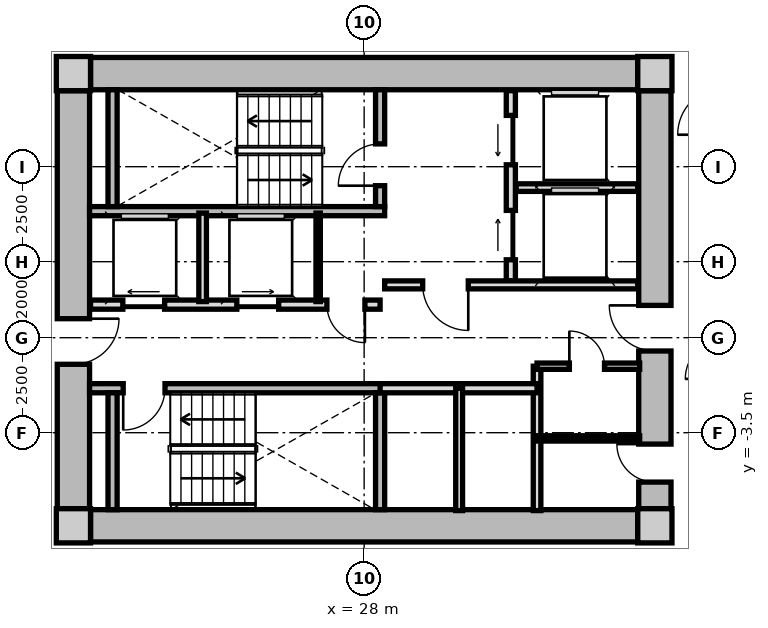
"""IFC4 building model, lengths in metres.
Left out: names, types, materials, properties, quantities, classifications, styles, units other than length and angle.
Written with IfcOpenShell. Run it as: python <this file> out.ifc"""

import sys

from ifc_helpers import new_model, si_unit, direction, frame, frame_2d, origin, origin_2d, place, context, subcontext, project, spatial, rectangle, extrude, source, transform, mapped, element, fill, save


model = new_model("IFC4")
c1 = context("Model", 3, precision=1e-05, world=origin(), true_north=direction((0.0, 1.0)))
c2 = subcontext(c1, "Body", "Model", "MODEL_VIEW")
j1 = project(units=[si_unit("LENGTHUNIT", "METRE"), si_unit("PLANEANGLEUNIT", "RADIAN")], contexts=[c1])
p1 = place(None, origin())
s1 = spatial("IfcSite", under=j1, at=p1, CompositionType="ELEMENT")
p2 = place(p1, origin())
s2 = spatial("IfcBuilding", under=s1, at=p2, CompositionType="ELEMENT")
p3 = place(p2, frame((0.0, 0.0, 55.15)))
s3 = spatial("IfcBuildingStorey", under=s2, at=p3, CompositionType="ELEMENT", Elevation=55.15)
m1 = source(origin(), c2, "Body", "SweptSolid", [
    extrude(rectangle(XDim=0.9, YDim=0.9, at=origin_2d()), origin(), (0.0, 0.0, 1.0), 3.05),
])
for number, where, z_axis, x_axis in (
    (1, (20.35, -5.95, 0.0), (0.0, 0.0, 1.0), (1.0, 0.0, 0.0)),
    (2, (35.65, -5.95, 0.0), (0.0, 0.0, 1.0), (1.0, 0.0, 0.0)),
    (3, (35.65, 5.95, 0.0), (0.0, 0.0, 1.0), (1.0, 0.0, 0.0)),
    (4, (20.35, 5.95, 0.0), (0.0, 0.0, 1.0), (1.0, 0.0, 0.0)),
):
    element("IfcColumn", number, at=place(p3, frame(where, z_axis=z_axis, x_axis=x_axis)), inside=s3, PredefinedType="COLUMN", context=c2, shape_type="MappedRepresentation", body=[
        mapped(m1, transform((0.0, 0.0, 0.0), x_axis=(1.0, 0.0, 0.0), y_axis=(0.0, 1.0, 0.0), z_axis=(0.0, 0.0, 1.0), scale=1.0)),
    ])
m2 = source(origin(), c2, "Body", "SweptSolid", [
    extrude(rectangle(XDim=14.4, YDim=0.85, at=frame_2d((7.2, 0.0))), origin(), (0.0, 0.0, 1.0), 2.79),
])
for number, where, z_axis, x_axis in (
    (5, (20.8, 5.95, 0.0), (0.0, 0.0, 1.0), (1.0, 0.0, 0.0)),
    (6, (35.2, -5.95, 0.0), (0.0, 0.0, 1.0), (-1.0, 0.0, 0.0)),
):
    element("IfcWall", number, at=place(p3, frame(where, z_axis=z_axis, x_axis=x_axis)), inside=s3, PredefinedType="SHEAR", context=c2, shape_type="MappedRepresentation", body=[
        mapped(m2, transform((0.0, 0.0, 0.0), x_axis=(1.0, 0.0, 0.0), y_axis=(0.0, 1.0, 0.0), z_axis=(0.0, 0.0, 1.0), scale=1.0)),
    ])
m3 = source(origin(), c2, "Body", "SweptSolid", [
    extrude(rectangle(XDim=11.0, YDim=0.85, at=frame_2d((5.5, 0.0))), origin(), (0.0, 0.0, 1.0), 2.79),
])
p4 = place(p3, frame((20.35, -5.5, 0.0), z_axis=(0.0, 0.0, 1.0), x_axis=(0.0, 1.0, 0.0)))
e7 = element("IfcWall", 7, at=p4, inside=s3, PredefinedType="SHEAR", context=c2, shape_type="MappedRepresentation", body=[
    mapped(m3, transform((0.0, 0.0, 0.0), x_axis=(1.0, 0.0, 0.0), y_axis=(0.0, 1.0, 0.0), z_axis=(0.0, 0.0, 1.0), scale=1.0)),
])
p5 = place(p4, frame((3.8, 0.0, 0.0)))
e8 = element("IfcOpeningElement", 8, at=p5, cuts=e7, PredefinedType="OPENING", context=c2, shape_type="SweptSolid", body=[
    extrude(rectangle(XDim=1.2, YDim=2.15, at=frame_2d((0.6, 1.075))), frame((0.0, 0.435, 0.0), z_axis=(0.0, -1.0, 0.0), x_axis=(1.0, 0.0, 0.0)), (0.0, 0.0, 1.0), 0.87),
])
p6 = place(p3, frame((35.65, 5.5, 0.0), z_axis=(0.0, 0.0, 1.0), x_axis=(0.0, -1.0, 0.0)))
e9 = element("IfcWall", 9, at=p6, inside=s3, PredefinedType="SHEAR", context=c2, shape_type="MappedRepresentation", body=[
    mapped(m3, transform((0.0, 0.0, 0.0), x_axis=(1.0, 0.0, 0.0), y_axis=(0.0, 1.0, 0.0), z_axis=(0.0, 0.0, 1.0), scale=1.0)),
])
p7 = place(p6, frame((5.65, 0.0, 0.0)))
e10 = element("IfcOpeningElement", 10, at=p7, cuts=e9, PredefinedType="OPENING", context=c2, shape_type="SweptSolid", body=[
    extrude(rectangle(XDim=1.2, YDim=2.15, at=frame_2d((0.6, 1.075))), frame((0.0, 0.435, 0.0), z_axis=(0.0, -1.0, 0.0), x_axis=(1.0, 0.0, 0.0)), (0.0, 0.0, 1.0), 0.87),
])
p8 = place(p6, frame((9.3, 0.0, 0.0)))
e11 = element("IfcOpeningElement", 11, at=p8, cuts=e9, PredefinedType="OPENING", context=c2, shape_type="SweptSolid", body=[
    extrude(rectangle(XDim=1.0, YDim=2.1, at=frame_2d((0.5, 1.05))), frame((0.0, 0.435, 0.0), z_axis=(0.0, -1.0, 0.0), x_axis=(1.0, 0.0, 0.0)), (0.0, 0.0, 1.0), 0.87),
])
m4 = source(origin(), c2, "Body", "SweptSolid", [
    extrude(rectangle(XDim=7.765, YDim=0.24, at=frame_2d((3.883, 0.0))), origin(), (0.0, 0.0, 1.0), 2.79),
])
p9 = place(p3, frame((20.775, 2.33, 0.0), z_axis=(0.0, 0.0, 1.0), x_axis=(1.0, 0.0, 0.0)))
e12 = element("IfcWall", 12, at=p9, inside=s3, PredefinedType="PARTITIONING", context=c2, shape_type="MappedRepresentation", body=[
    mapped(m4, transform((0.0, 0.0, 0.0), x_axis=(1.0, 0.0, 0.0), y_axis=(0.0, 1.0, 0.0), z_axis=(0.0, 0.0, 1.0), scale=1.0)),
])
m5 = source(origin(), c2, "Body", "SweptSolid", [
    extrude(rectangle(XDim=3.075, YDim=0.24, at=frame_2d((1.538, 0.0))), origin(), (0.0, 0.0, 1.0), 2.79),
])
p10 = place(p3, frame((21.38, 2.45, 0.0), z_axis=(0.0, 0.0, 1.0), x_axis=(0.0, 1.0, 0.0)))
e13 = element("IfcWall", 13, at=p10, inside=s3, PredefinedType="PARTITIONING", context=c2, shape_type="MappedRepresentation", body=[
    mapped(m5, transform((0.0, 0.0, 0.0), x_axis=(1.0, 0.0, 0.0), y_axis=(0.0, 1.0, 0.0), z_axis=(0.0, 0.0, 1.0), scale=1.0)),
])
p11 = place(p3, frame((28.42, 2.45, 0.0), z_axis=(0.0, 0.0, 1.0), x_axis=(0.0, 1.0, 0.0)))
e14 = element("IfcWall", 14, at=p11, inside=s3, PredefinedType="PARTITIONING", context=c2, shape_type="MappedRepresentation", body=[
    mapped(m5, transform((0.0, 0.0, 0.0), x_axis=(1.0, 0.0, 0.0), y_axis=(0.0, 1.0, 0.0), z_axis=(0.0, 0.0, 1.0), scale=1.0)),
])
p12 = place(p11, frame((0.55, 0.0, 0.0)))
e15 = element("IfcOpeningElement", 15, at=p12, cuts=e14, PredefinedType="OPENING", context=c2, shape_type="SweptSolid", body=[
    extrude(rectangle(XDim=1.1, YDim=2.15, at=frame_2d((0.55, 1.075))), frame((0.0, 0.13, 0.0), z_axis=(0.0, -1.0, 0.0), x_axis=(1.0, 0.0, 0.0)), (0.0, 0.0, 1.0), 0.26),
])
p13 = place(p3, frame((20.775, -2.33, 0.0), z_axis=(0.0, 0.0, 1.0), x_axis=(1.0, 0.0, 0.0)))
e16 = element("IfcWall", 16, at=p13, inside=s3, PredefinedType="PARTITIONING", context=c2, shape_type="MappedRepresentation", body=[
    mapped(m4, transform((0.0, 0.0, 0.0), x_axis=(1.0, 0.0, 0.0), y_axis=(0.0, 1.0, 0.0), z_axis=(0.0, 0.0, 1.0), scale=1.0)),
])
p14 = place(p13, frame((0.885, 0.0, 0.0)))
e17 = element("IfcOpeningElement", 17, at=p14, cuts=e16, PredefinedType="OPENING", context=c2, shape_type="SweptSolid", body=[
    extrude(rectangle(XDim=1.1, YDim=2.15, at=frame_2d((0.55, 1.075))), frame((0.0, 0.13, 0.0), z_axis=(0.0, -1.0, 0.0), x_axis=(1.0, 0.0, 0.0)), (0.0, 0.0, 1.0), 0.26),
])
for number, where, z_axis, x_axis in (
    (18, (21.38, -5.525, 0.0), (0.0, 0.0, 1.0), (0.0, 1.0, 0.0)),
    (19, (28.42, -5.525, 0.0), (0.0, 0.0, 1.0), (0.0, 1.0, 0.0)),
):
    element("IfcWall", number, at=place(p3, frame(where, z_axis=z_axis, x_axis=x_axis)), inside=s3, PredefinedType="PARTITIONING", context=c2, shape_type="MappedRepresentation", body=[
        mapped(m5, transform((0.0, 0.0, 0.0), x_axis=(1.0, 0.0, 0.0), y_axis=(0.0, 1.0, 0.0), z_axis=(0.0, 0.0, 1.0), scale=1.0)),
    ])
m6 = source(origin(), c2, "Body", "SweptSolid", [
    extrude(rectangle(XDim=5.0, YDim=0.24, at=frame_2d((2.5, 0.0))), origin(), (0.0, 0.0, 1.0), 2.775),
])
p15 = place(p3, frame((31.86, 0.5, 0.0), z_axis=(0.0, 0.0, 1.0), x_axis=(0.0, 1.0, 0.0)))
e20 = element("IfcWall", 20, at=p15, inside=s3, PredefinedType="PARTITIONING", context=c2, shape_type="MappedRepresentation", body=[
    mapped(m6, transform((0.0, 0.0, 0.0), x_axis=(1.0, 0.0, 0.0), y_axis=(0.0, 1.0, 0.0), z_axis=(0.0, 0.0, 1.0), scale=1.0)),
])
p16 = place(p15, frame((3.05, 0.0, 0.0)))
e21 = element("IfcOpeningElement", 21, at=p16, cuts=e20, PredefinedType="OPENING", context=c2, shape_type="SweptSolid", body=[
    extrude(rectangle(XDim=1.3, YDim=2.2, at=frame_2d((0.65, 1.1))), frame((0.0, 0.13, 0.0), z_axis=(0.0, -1.0, 0.0), x_axis=(1.0, 0.0, 0.0)), (0.0, 0.0, 1.0), 0.26),
])
p17 = place(p15, frame((0.55, 0.0, 0.0)))
e22 = element("IfcOpeningElement", 22, at=p17, cuts=e20, PredefinedType="OPENING", context=c2, shape_type="SweptSolid", body=[
    extrude(rectangle(XDim=1.3, YDim=2.2, at=frame_2d((0.65, 1.1))), frame((0.0, 0.13, 0.0), z_axis=(0.0, -1.0, 0.0), x_axis=(1.0, 0.0, 0.0)), (0.0, 0.0, 1.0), 0.26),
])
m7 = source(origin(), c2, "Body", "SweptSolid", [
    extrude(rectangle(XDim=3.2, YDim=0.2, at=frame_2d((1.6, 0.0))), origin(), (0.0, 0.0, 1.0), 2.775),
])
p18 = place(p3, frame((32.0, 2.95, 0.0), z_axis=(0.0, 0.0, 1.0), x_axis=(1.0, 0.0, 0.0)))
e23 = element("IfcWall", 23, at=p18, inside=s3, PredefinedType="PARTITIONING", context=c2, shape_type="MappedRepresentation", body=[
    mapped(m7, transform((0.0, 0.0, 0.0), x_axis=(1.0, 0.0, 0.0), y_axis=(0.0, 1.0, 0.0), z_axis=(0.0, 0.0, 1.0), scale=1.0)),
])
m8 = source(origin(), c2, "Body", "SweptSolid", [
    extrude(rectangle(XDim=6.66, YDim=0.21, at=frame_2d((3.33, 0.0))), origin(), (0.0, 0.0, 1.0), 2.775),
])
p19 = place(p3, frame((28.54, 0.39, 0.0), z_axis=(0.0, 0.0, 1.0), x_axis=(1.0, 0.0, 0.0)))
e24 = element("IfcWall", 24, at=p19, inside=s3, PredefinedType="PARTITIONING", context=c2, shape_type="MappedRepresentation", body=[
    mapped(m8, transform((0.0, 0.0, 0.0), x_axis=(1.0, 0.0, 0.0), y_axis=(0.0, 1.0, 0.0), z_axis=(0.0, 0.0, 1.0), scale=1.0)),
])
p20 = place(p19, frame((1.0, 0.0, 0.0)))
e25 = element("IfcOpeningElement", 25, at=p20, cuts=e24, PredefinedType="OPENING", context=c2, shape_type="SweptSolid", body=[
    extrude(rectangle(XDim=1.2, YDim=2.15, at=frame_2d((0.6, 1.075))), frame((0.0, 0.115, 0.0), z_axis=(0.0, -1.0, 0.0), x_axis=(1.0, 0.0, 0.0)), (0.0, 0.0, 1.0), 0.23),
])
m9 = source(origin(), c2, "Body", "SweptSolid", [
    extrude(rectangle(XDim=7.62, YDim=0.24, at=frame_2d((3.81, 0.0))), origin(), (0.0, 0.0, 1.0), 2.775),
])
p21 = place(p3, frame((20.8, -0.13, 0.0), z_axis=(0.0, 0.0, 1.0), x_axis=(1.0, 0.0, 0.0)))
e26 = element("IfcWall", 26, at=p21, inside=s3, PredefinedType="PARTITIONING", context=c2, shape_type="MappedRepresentation", body=[
    mapped(m9, transform((0.0, 0.0, 0.0), x_axis=(1.0, 0.0, 0.0), y_axis=(0.0, 1.0, 0.0), z_axis=(0.0, 0.0, 1.0), scale=1.0)),
])
p22 = place(p21, frame((6.22, 0.0, 0.0)))
e27 = element("IfcOpeningElement", 27, at=p22, cuts=e26, PredefinedType="OPENING", context=c2, shape_type="SweptSolid", body=[
    extrude(rectangle(XDim=1.0, YDim=2.1, at=frame_2d((0.5, 1.05))), frame((0.0, 0.13, 0.0), z_axis=(0.0, -1.0, 0.0), x_axis=(1.0, 0.0, 0.0)), (0.0, 0.0, 1.0), 0.26),
])
p23 = place(p21, frame((0.85, 0.0, 0.0)))
e28 = element("IfcOpeningElement", 28, at=p23, cuts=e26, PredefinedType="OPENING", context=c2, shape_type="SweptSolid", body=[
    extrude(rectangle(XDim=1.1, YDim=2.2, at=frame_2d((0.55, 1.1))), frame((0.0, 0.13, 0.0), z_axis=(0.0, -1.0, 0.0), x_axis=(1.0, 0.0, 0.0)), (0.0, 0.0, 1.0), 0.26),
])
p24 = place(p21, frame((3.85, 0.0, 0.0)))
e29 = element("IfcOpeningElement", 29, at=p24, cuts=e26, PredefinedType="OPENING", context=c2, shape_type="SweptSolid", body=[
    extrude(rectangle(XDim=1.1, YDim=2.2, at=frame_2d((0.55, 1.1))), frame((0.0, 0.13, 0.0), z_axis=(0.0, -1.0, 0.0), x_axis=(1.0, 0.0, 0.0)), (0.0, 0.0, 1.0), 0.26),
])
m10 = source(origin(), c2, "Body", "SweptSolid", [
    extrude(rectangle(XDim=2.33, YDim=0.115, at=frame_2d((1.165, 0.0))), origin(), (0.0, 0.0, 1.0), 2.775),
])
p25 = place(p3, frame((26.79, -0.05, 0.0), z_axis=(0.0, 0.0, 1.0), x_axis=(0.0, 1.0, 0.0)))
e30 = element("IfcWall", 30, at=p25, inside=s3, PredefinedType="PARTITIONING", context=c2, shape_type="MappedRepresentation", body=[
    mapped(m10, transform((0.0, 0.0, 0.0), x_axis=(1.0, 0.0, 0.0), y_axis=(0.0, 1.0, 0.0), z_axis=(0.0, 0.0, 1.0), scale=1.0)),
])
m11 = source(origin(), c2, "Body", "SweptSolid", [
    extrude(rectangle(XDim=2.33, YDim=0.2, at=frame_2d((1.165, 0.0))), origin(), (0.0, 0.0, 1.0), 2.775),
])
p26 = place(p3, frame((23.75, -0.05, 0.0), z_axis=(0.0, 0.0, 1.0), x_axis=(0.0, 1.0, 0.0)))
e31 = element("IfcWall", 31, at=p26, inside=s3, PredefinedType="PARTITIONING", context=c2, shape_type="MappedRepresentation", body=[
    mapped(m11, transform((0.0, 0.0, 0.0), x_axis=(1.0, 0.0, 0.0), y_axis=(0.0, 1.0, 0.0), z_axis=(0.0, 0.0, 1.0), scale=1.0)),
])
m12 = source(origin(), c2, "Body", "SweptSolid", [
    extrude(rectangle(XDim=3.8, YDim=0.2, at=frame_2d((1.9, 0.0))), origin(), (0.0, 0.0, 1.0), 2.775),
])
p27 = place(p3, frame((32.55, -5.55, 0.0), z_axis=(0.0, 0.0, 1.0), x_axis=(0.0, 1.0, 0.0)))
e32 = element("IfcWall", 32, at=p27, inside=s3, PredefinedType="PARTITIONING", context=c2, shape_type="MappedRepresentation", body=[
    mapped(m12, transform((0.0, 0.0, 0.0), x_axis=(1.0, 0.0, 0.0), y_axis=(0.0, 1.0, 0.0), z_axis=(0.0, 0.0, 1.0), scale=1.0)),
])
m13 = source(origin(), c2, "Body", "SweptSolid", [
    extrude(rectangle(XDim=4.13, YDim=0.24, at=frame_2d((2.065, 0.0))), origin(), (0.0, 0.0, 1.0), 2.775),
])
p28 = place(p3, frame((28.42, -2.33, 0.0), z_axis=(0.0, 0.0, 1.0), x_axis=(1.0, 0.0, 0.0)))
e33 = element("IfcWall", 33, at=p28, inside=s3, PredefinedType="PARTITIONING", context=c2, shape_type="MappedRepresentation", body=[
    mapped(m13, transform((0.0, 0.0, 0.0), x_axis=(1.0, 0.0, 0.0), y_axis=(0.0, 1.0, 0.0), z_axis=(0.0, 0.0, 1.0), scale=1.0)),
])
m14 = source(origin(), c2, "Body", "SweptSolid", [
    extrude(rectangle(XDim=3.22, YDim=0.18, at=frame_2d((1.61, 0.0))), origin(), (0.0, 0.0, 1.0), 2.775),
])
p29 = place(p3, frame((30.5, -5.55, 0.0), z_axis=(0.0, 0.0, 1.0), x_axis=(0.0, 1.0, 0.0)))
e34 = element("IfcWall", 34, at=p29, inside=s3, PredefinedType="PARTITIONING", context=c2, shape_type="MappedRepresentation", body=[
    mapped(m14, transform((0.0, 0.0, 0.0), x_axis=(1.0, 0.0, 0.0), y_axis=(0.0, 1.0, 0.0), z_axis=(0.0, 0.0, 1.0), scale=1.0)),
])
m15 = source(origin(), c2, "Body", "SweptSolid", [
    extrude(rectangle(XDim=2.7, YDim=0.165, at=frame_2d((1.35, 0.0))), origin(), (0.0, 0.0, 1.0), 2.775),
])
p30 = place(p3, frame((32.55, -1.75, 0.0), z_axis=(0.0, 0.0, 1.0), x_axis=(1.0, 0.0, 0.0)))
e35 = element("IfcWall", 35, at=p30, inside=s3, PredefinedType="PARTITIONING", context=c2, shape_type="MappedRepresentation", body=[
    mapped(m15, transform((0.0, 0.0, 0.0), x_axis=(1.0, 0.0, 0.0), y_axis=(0.0, 1.0, 0.0), z_axis=(0.0, 0.0, 1.0), scale=1.0)),
])
p31 = place(p30, frame((0.85, 0.0, 0.0)))
e36 = element("IfcOpeningElement", 36, at=p31, cuts=e35, PredefinedType="OPENING", context=c2, shape_type="SweptSolid", body=[
    extrude(rectangle(XDim=0.925, YDim=2.1, at=frame_2d((0.462, 1.05))), frame((0.0, 0.093, 0.0), z_axis=(0.0, -1.0, 0.0), x_axis=(1.0, 0.0, 0.0)), (0.0, 0.0, 1.0), 0.185),
])
m16 = source(origin(), c2, "Body", "SweptSolid", [
    extrude(rectangle(XDim=2.7, YDim=0.14, at=frame_2d((1.35, 0.0))), origin(), (0.0, 0.0, 1.0), 2.775),
])
p32 = place(p3, frame((32.55, -3.65, 0.0), z_axis=(0.0, 0.0, 1.0), x_axis=(1.0, 0.0, 0.0)))
e37 = element("IfcWall", 37, at=p32, inside=s3, PredefinedType="PARTITIONING", context=c2, shape_type="MappedRepresentation", body=[
    mapped(m16, transform((0.0, 0.0, 0.0), x_axis=(1.0, 0.0, 0.0), y_axis=(0.0, 1.0, 0.0), z_axis=(0.0, 0.0, 1.0), scale=1.0)),
])
m17 = source(origin(), c2, "Body", "SweptSolid", [
    extrude(rectangle(XDim=1.1, YDim=2.15, at=frame_2d((0.55, 1.075))), frame((0.0, 0.025, 0.0), z_axis=(0.0, -1.0, 0.0), x_axis=(1.0, 0.0, 0.0)), (0.0, 0.0, 1.0), 0.05),
])
p33 = place(p12, origin())
e38 = element("IfcDoor", 38, at=p33, inside=s3, OperationType="SINGLE_SWING_LEFT", PredefinedType="DOOR", context=c2, shape_type="MappedRepresentation", body=[
    mapped(m17, transform((0.0, 0.0, 0.0), x_axis=(1.0, 0.0, 0.0), y_axis=(0.0, 1.0, 0.0), z_axis=(0.0, 0.0, 1.0), scale=1.0)),
])
fill(e15, e38)
p34 = place(p14, frame((1.1, 0.0, 0.0), z_axis=(0.0, 0.0, 1.0), x_axis=(-1.0, 0.0, 0.0)))
e39 = element("IfcDoor", 39, at=p34, inside=s3, OperationType="SINGLE_SWING_RIGHT", PredefinedType="DOOR", context=c2, shape_type="MappedRepresentation", body=[
    mapped(m17, transform((0.0, 0.0, 0.0), x_axis=(1.0, 0.0, 0.0), y_axis=(0.0, 1.0, 0.0), z_axis=(0.0, 0.0, 1.0), scale=1.0)),
])
fill(e17, e39)
m18 = source(origin(), c2, "Body", "SweptSolid", [
    extrude(rectangle(XDim=1.3, YDim=2.2, at=frame_2d((0.65, 1.1))), frame((0.0, 0.025, 0.0), z_axis=(0.0, -1.0, 0.0), x_axis=(1.0, 0.0, 0.0)), (0.0, 0.0, 1.0), 0.05),
])
p35 = place(p16, origin())
e40 = element("IfcDoor", 40, at=p35, inside=s3, OperationType="SLIDING_TO_LEFT", PredefinedType="DOOR", context=c2, shape_type="MappedRepresentation", body=[
    mapped(m18, transform((0.0, 0.0, 0.0), x_axis=(1.0, 0.0, 0.0), y_axis=(0.0, 1.0, 0.0), z_axis=(0.0, 0.0, 1.0), scale=1.0)),
])
fill(e21, e40)
p36 = place(p17, origin())
e41 = element("IfcDoor", 41, at=p36, inside=s3, OperationType="SLIDING_TO_RIGHT", PredefinedType="DOOR", context=c2, shape_type="MappedRepresentation", body=[
    mapped(m18, transform((0.0, 0.0, 0.0), x_axis=(1.0, 0.0, 0.0), y_axis=(0.0, 1.0, 0.0), z_axis=(0.0, 0.0, 1.0), scale=1.0)),
])
fill(e22, e41)
m19 = source(origin(), c2, "Body", "SweptSolid", [
    extrude(rectangle(XDim=1.2, YDim=2.15, at=frame_2d((0.6, 1.075))), frame((0.0, 0.025, 0.0), z_axis=(0.0, -1.0, 0.0), x_axis=(1.0, 0.0, 0.0)), (0.0, 0.0, 1.0), 0.05),
])
p37 = place(p20, frame((1.2, 0.0, 0.0), z_axis=(0.0, 0.0, 1.0), x_axis=(-1.0, 0.0, 0.0)))
e42 = element("IfcDoor", 42, at=p37, inside=s3, OperationType="SINGLE_SWING_LEFT", PredefinedType="DOOR", context=c2, shape_type="MappedRepresentation", body=[
    mapped(m19, transform((0.0, 0.0, 0.0), x_axis=(1.0, 0.0, 0.0), y_axis=(0.0, 1.0, 0.0), z_axis=(0.0, 0.0, 1.0), scale=1.0)),
])
fill(e25, e42)
p38 = place(p5, frame((1.2, 0.0, 0.0), z_axis=(0.0, 0.0, 1.0), x_axis=(-1.0, 0.0, 0.0)))
e43 = element("IfcDoor", 43, at=p38, inside=s3, OperationType="SINGLE_SWING_LEFT", PredefinedType="DOOR", context=c2, shape_type="MappedRepresentation", body=[
    mapped(m19, transform((0.0, 0.0, 0.0), x_axis=(1.0, 0.0, 0.0), y_axis=(0.0, 1.0, 0.0), z_axis=(0.0, 0.0, 1.0), scale=1.0)),
])
fill(e8, e43)
p39 = place(p7, frame((1.2, 0.0, 0.0), z_axis=(0.0, 0.0, 1.0), x_axis=(-1.0, 0.0, 0.0)))
e44 = element("IfcDoor", 44, at=p39, inside=s3, OperationType="SINGLE_SWING_RIGHT", PredefinedType="DOOR", context=c2, shape_type="MappedRepresentation", body=[
    mapped(m19, transform((0.0, 0.0, 0.0), x_axis=(1.0, 0.0, 0.0), y_axis=(0.0, 1.0, 0.0), z_axis=(0.0, 0.0, 1.0), scale=1.0)),
])
fill(e10, e44)
m20 = source(origin(), c2, "Body", "SweptSolid", [
    extrude(rectangle(XDim=1.0, YDim=2.1, at=frame_2d((0.5, 1.05))), frame((0.0, 0.025, 0.0), z_axis=(0.0, -1.0, 0.0), x_axis=(1.0, 0.0, 0.0)), (0.0, 0.0, 1.0), 0.05),
])
p40 = place(p22, frame((1.0, 0.0, 0.0), z_axis=(0.0, 0.0, 1.0), x_axis=(-1.0, 0.0, 0.0)))
e45 = element("IfcDoor", 45, at=p40, inside=s3, OperationType="SINGLE_SWING_LEFT", PredefinedType="DOOR", context=c2, shape_type="MappedRepresentation", body=[
    mapped(m20, transform((0.0, 0.0, 0.0), x_axis=(1.0, 0.0, 0.0), y_axis=(0.0, 1.0, 0.0), z_axis=(0.0, 0.0, 1.0), scale=1.0)),
])
fill(e27, e45)
m21 = source(origin(), c2, "Body", "SweptSolid", [
    extrude(rectangle(XDim=1.1, YDim=2.2, at=frame_2d((0.55, 1.1))), frame((0.0, 0.025, 0.0), z_axis=(0.0, -1.0, 0.0), x_axis=(1.0, 0.0, 0.0)), (0.0, 0.0, 1.0), 0.05),
])
p41 = place(p23, origin())
e46 = element("IfcDoor", 46, at=p41, inside=s3, OperationType="SLIDING_TO_LEFT", PredefinedType="DOOR", context=c2, shape_type="MappedRepresentation", body=[
    mapped(m21, transform((0.0, 0.0, 0.0), x_axis=(1.0, 0.0, 0.0), y_axis=(0.0, 1.0, 0.0), z_axis=(0.0, 0.0, 1.0), scale=1.0)),
])
fill(e28, e46)
p42 = place(p24, origin())
e47 = element("IfcDoor", 47, at=p42, inside=s3, OperationType="SLIDING_TO_RIGHT", PredefinedType="DOOR", context=c2, shape_type="MappedRepresentation", body=[
    mapped(m21, transform((0.0, 0.0, 0.0), x_axis=(1.0, 0.0, 0.0), y_axis=(0.0, 1.0, 0.0), z_axis=(0.0, 0.0, 1.0), scale=1.0)),
])
fill(e29, e47)
m22 = source(origin(), c2, "Body", "SweptSolid", [
    extrude(rectangle(XDim=0.925, YDim=2.1, at=frame_2d((0.462, 1.05))), frame((0.0, 0.025, 0.0), z_axis=(0.0, -1.0, 0.0), x_axis=(1.0, 0.0, 0.0)), (0.0, 0.0, 1.0), 0.05),
])
p43 = place(p31, origin())
e48 = element("IfcDoor", 48, at=p43, inside=s3, OperationType="SINGLE_SWING_LEFT", PredefinedType="DOOR", context=c2, shape_type="MappedRepresentation", body=[
    mapped(m22, transform((0.0, 0.0, 0.0), x_axis=(1.0, 0.0, 0.0), y_axis=(0.0, 1.0, 0.0), z_axis=(0.0, 0.0, 1.0), scale=1.0)),
])
fill(e36, e48)
p44 = place(p8, frame((1.0, 0.0, 0.0), z_axis=(0.0, 0.0, 1.0), x_axis=(-1.0, 0.0, 0.0)))
e49 = element("IfcDoor", 49, at=p44, inside=s3, OperationType="SINGLE_SWING_RIGHT", PredefinedType="DOOR", context=c2, shape_type="MappedRepresentation", body=[
    mapped(m20, transform((0.0, 0.0, 0.0), x_axis=(1.0, 0.0, 0.0), y_axis=(0.0, 1.0, 0.0), z_axis=(0.0, 0.0, 1.0), scale=1.0)),
])
fill(e11, e49)
save(model, sys.argv[1])
